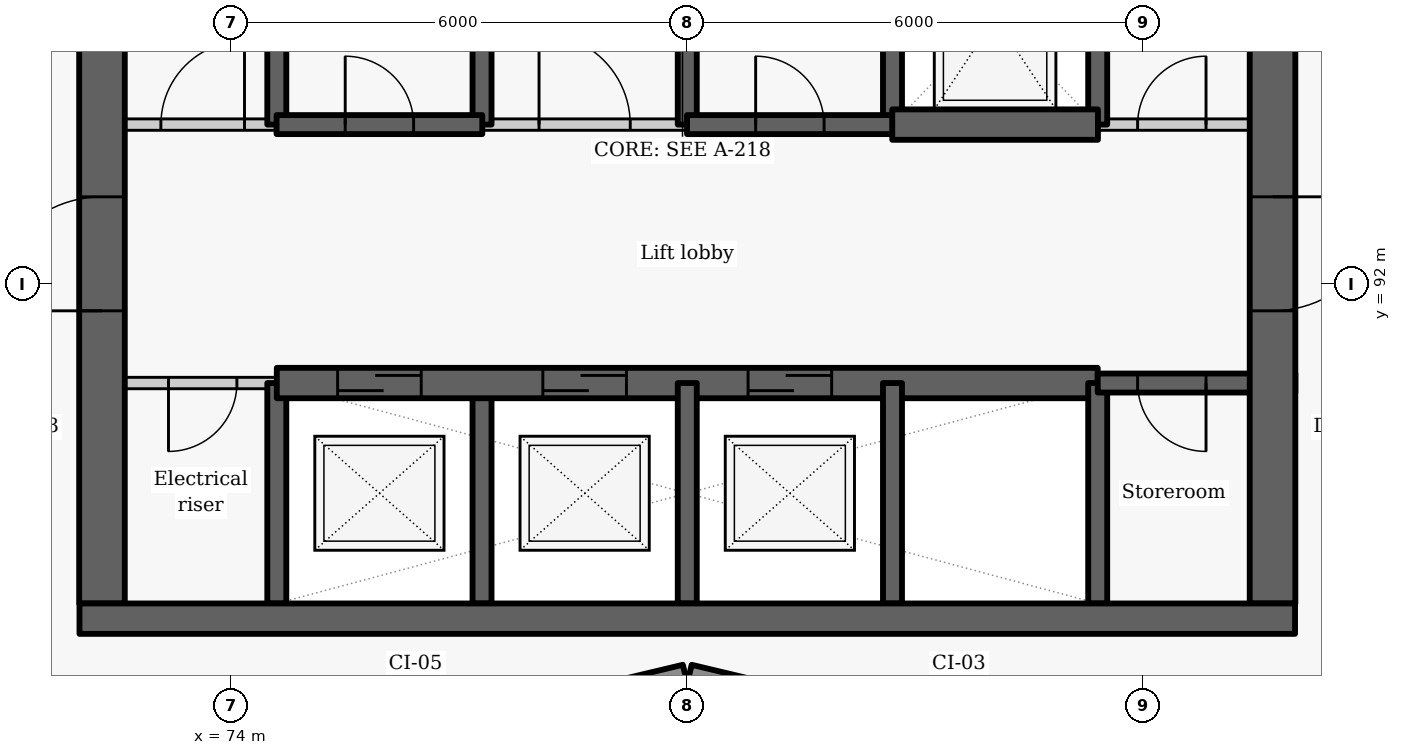
"""IFC4 building model, lengths in metres.
Left out: names, types, materials, properties, quantities, classifications, styles, units other than length and angle.
Written with IfcOpenShell. Run it as: python <this file> out.ifc"""

import sys

from ifc_helpers import new_model, si_unit, direction, frame, frame_2d, origin, place, context, subcontext, project, spatial, rectangle, extrude, element, fill, save


model = new_model("IFC4")
c1 = context("Model", 3, precision=1e-05, world=origin(), true_north=direction((0.0, 1.0)))
c2 = subcontext(c1, "Body", "Model", "MODEL_VIEW")
j1 = project(units=[si_unit("LENGTHUNIT", "METRE"), si_unit("PLANEANGLEUNIT", "RADIAN")], contexts=[c1])
p1 = place(None, origin())
s1 = spatial("IfcSite", under=j1, at=p1, CompositionType="ELEMENT")
p2 = place(p1, origin())
s2 = spatial("IfcBuilding", under=s1, at=p2, CompositionType="ELEMENT")
p3 = place(p2, frame((0.0, 0.0, 87.6)))
s3 = spatial("IfcBuildingStorey", under=s2, at=p3, CompositionType="ELEMENT", Elevation=87.6)
for number, where, z_axis, x_axis in (
    (1, (76.814, 86.119, 0.0), (0.0, 0.0, 1.0), (0.973, 0.232, 0.0)),
    (2, (80.029, 86.872, 0.0), (0.0, 0.0, 1.0), (0.973, -0.232, 0.0)),
):
    element("IfcWall", number, at=place(p3, frame(where, z_axis=z_axis, x_axis=x_axis)), inside=s3, PredefinedType="SOLIDWALL", context=c2, shape_type="SweptSolid", body=[
        extrude(rectangle(XDim=3.246, YDim=0.25, at=frame_2d((1.623, 0.0))), origin(), (0.0, 0.0, 1.0), 2.425),
    ])
p4 = place(p3, frame((74.6, 87.8, -0.275), z_axis=(0.0, 0.0, 1.0), x_axis=(0.0, 1.0, 0.0)))
e3 = element("IfcWall", 3, at=p4, inside=s3, PredefinedType="SHEAR", context=c2, shape_type="SweptSolid", body=[
    extrude(rectangle(XDim=2.9, YDim=0.25, at=frame_2d((1.45, 0.0))), origin(), (0.0, 0.0, 1.0), 3.3),
])
p5 = place(p3, frame((74.6, 94.1, -0.275), z_axis=(0.0, 0.0, 1.0), x_axis=(0.0, 1.0, 0.0)))
e4 = element("IfcWall", 4, at=p5, inside=s3, PredefinedType="SHEAR", context=c2, shape_type="SweptSolid", body=[
    extrude(rectangle(XDim=2.8, YDim=0.25, at=frame_2d((1.4, 0.0))), origin(), (0.0, 0.0, 1.0), 3.3),
])
p6 = place(p3, frame((74.6, 90.7, 0.0), z_axis=(0.0, 0.0, 1.0), x_axis=(-1.0, 0.0, 0.0)))
e5 = element("IfcWall", 5, at=p6, inside=s3, PredefinedType="PARTITIONING", context=c2, shape_type="SweptSolid", body=[
    extrude(rectangle(XDim=2.6, YDim=0.15, at=frame_2d((1.3, 0.0))), origin(), (0.0, 0.0, 1.0), 3.025),
])
p7 = place(p6, frame((0.525, 0.0, 0.0)))
e6 = element("IfcOpeningElement", 6, at=p7, cuts=e5, PredefinedType="OPENING", context=c2, shape_type="SweptSolid", body=[
    extrude(rectangle(XDim=0.9, YDim=2.1, at=frame_2d((0.45, 1.05))), frame((0.0, 0.085, 0.0), z_axis=(0.0, -1.0, 0.0), x_axis=(1.0, 0.0, 0.0)), (0.0, 0.0, 1.0), 0.17),
])
p8 = place(p3, frame((72.3, 87.8, -0.275), z_axis=(0.0, 0.0, 1.0), x_axis=(0.0, 1.0, 0.0)))
e7 = element("IfcWall", 7, at=p8, inside=s3, PredefinedType="SHEAR", context=c2, shape_type="SweptSolid", body=[
    extrude(rectangle(XDim=9.1, YDim=0.6, at=frame_2d((4.55, 0.0))), origin(), (0.0, 0.0, 1.0), 3.3),
])
p9 = place(p8, frame((3.85, 0.0, 0.275)))
e8 = element("IfcOpeningElement", 8, at=p9, cuts=e7, PredefinedType="OPENING", context=c2, shape_type="SweptSolid", body=[
    extrude(rectangle(XDim=1.5, YDim=2.1, at=frame_2d((0.75, 1.05))), frame((0.0, 0.31, 0.0), z_axis=(0.0, -1.0, 0.0), x_axis=(1.0, 0.0, 0.0)), (0.0, 0.0, 1.0), 0.62),
])
p10 = place(p3, frame((77.3, 87.8, -0.275), z_axis=(0.0, 0.0, 1.0), x_axis=(0.0, 1.0, 0.0)))
e9 = element("IfcWall", 9, at=p10, inside=s3, PredefinedType="SHEAR", context=c2, shape_type="SweptSolid", body=[
    extrude(rectangle(XDim=2.9, YDim=0.25, at=frame_2d((1.45, 0.0))), origin(), (0.0, 0.0, 1.0), 3.3),
])
p11 = place(p3, frame((77.3, 94.1, -0.275), z_axis=(0.0, 0.0, 1.0), x_axis=(0.0, 1.0, 0.0)))
e10 = element("IfcWall", 10, at=p11, inside=s3, PredefinedType="SHEAR", context=c2, shape_type="SweptSolid", body=[
    extrude(rectangle(XDim=2.8, YDim=0.25, at=frame_2d((1.4, 0.0))), origin(), (0.0, 0.0, 1.0), 3.3),
])
p12 = place(p3, frame((74.6, 90.7, -0.275), z_axis=(0.0, 0.0, 1.0), x_axis=(1.0, 0.0, 0.0)))
e11 = element("IfcWall", 11, at=p12, inside=s3, PredefinedType="SHEAR", context=c2, shape_type="SweptSolid", body=[
    extrude(rectangle(XDim=10.8, YDim=0.4, at=frame_2d((5.4, 0.0))), origin(), (0.0, 0.0, 1.0), 3.3),
])
p13 = place(p12, frame((0.8, 0.0, 0.275)))
e12 = element("IfcOpeningElement", 12, at=p13, cuts=e11, PredefinedType="OPENING", context=c2, shape_type="SweptSolid", body=[
    extrude(rectangle(XDim=1.1, YDim=2.1, at=frame_2d((0.55, 1.05))), frame((0.0, 0.21, 0.0), z_axis=(0.0, -1.0, 0.0), x_axis=(1.0, 0.0, 0.0)), (0.0, 0.0, 1.0), 0.42),
])
p14 = place(p12, frame((3.5, 0.0, 0.275)))
e13 = element("IfcOpeningElement", 13, at=p14, cuts=e11, PredefinedType="OPENING", context=c2, shape_type="SweptSolid", body=[
    extrude(rectangle(XDim=1.1, YDim=2.1, at=frame_2d((0.55, 1.05))), frame((0.0, 0.21, 0.0), z_axis=(0.0, -1.0, 0.0), x_axis=(1.0, 0.0, 0.0)), (0.0, 0.0, 1.0), 0.42),
])
p15 = place(p12, frame((6.2, 0.0, 0.275)))
e14 = element("IfcOpeningElement", 14, at=p15, cuts=e11, PredefinedType="OPENING", context=c2, shape_type="SweptSolid", body=[
    extrude(rectangle(XDim=1.1, YDim=2.1, at=frame_2d((0.55, 1.05))), frame((0.0, 0.21, 0.0), z_axis=(0.0, -1.0, 0.0), x_axis=(1.0, 0.0, 0.0)), (0.0, 0.0, 1.0), 0.42),
])
p16 = place(p3, frame((80.0, 87.8, -0.275), z_axis=(0.0, 0.0, 1.0), x_axis=(0.0, 1.0, 0.0)))
e15 = element("IfcWall", 15, at=p16, inside=s3, PredefinedType="SHEAR", context=c2, shape_type="SweptSolid", body=[
    extrude(rectangle(XDim=2.9, YDim=0.25, at=frame_2d((1.45, 0.0))), origin(), (0.0, 0.0, 1.0), 3.3),
])
p17 = place(p3, frame((80.0, 94.1, -0.275), z_axis=(0.0, 0.0, 1.0), x_axis=(0.0, 1.0, 0.0)))
e16 = element("IfcWall", 16, at=p17, inside=s3, PredefinedType="SHEAR", context=c2, shape_type="SweptSolid", body=[
    extrude(rectangle(XDim=2.8, YDim=0.25, at=frame_2d((1.4, 0.0))), origin(), (0.0, 0.0, 1.0), 3.3),
])
p18 = place(p3, frame((82.7, 87.8, -0.275), z_axis=(0.0, 0.0, 1.0), x_axis=(0.0, 1.0, 0.0)))
e17 = element("IfcWall", 17, at=p18, inside=s3, PredefinedType="SHEAR", context=c2, shape_type="SweptSolid", body=[
    extrude(rectangle(XDim=2.9, YDim=0.25, at=frame_2d((1.45, 0.0))), origin(), (0.0, 0.0, 1.0), 3.3),
])
p19 = place(p3, frame((82.7, 94.1, -0.275), z_axis=(0.0, 0.0, 1.0), x_axis=(0.0, 1.0, 0.0)))
e18 = element("IfcWall", 18, at=p19, inside=s3, PredefinedType="SHEAR", context=c2, shape_type="SweptSolid", body=[
    extrude(rectangle(XDim=2.8, YDim=0.25, at=frame_2d((1.4, 0.0))), origin(), (0.0, 0.0, 1.0), 3.3),
])
p20 = place(p3, frame((85.4, 87.8, -0.275), z_axis=(0.0, 0.0, 1.0), x_axis=(0.0, 1.0, 0.0)))
e19 = element("IfcWall", 19, at=p20, inside=s3, PredefinedType="SHEAR", context=c2, shape_type="SweptSolid", body=[
    extrude(rectangle(XDim=2.9, YDim=0.25, at=frame_2d((1.45, 0.0))), origin(), (0.0, 0.0, 1.0), 3.3),
])
p21 = place(p3, frame((85.4, 94.1, -0.275), z_axis=(0.0, 0.0, 1.0), x_axis=(0.0, 1.0, 0.0)))
e20 = element("IfcWall", 20, at=p21, inside=s3, PredefinedType="SHEAR", context=c2, shape_type="SweptSolid", body=[
    extrude(rectangle(XDim=2.8, YDim=0.25, at=frame_2d((1.4, 0.0))), origin(), (0.0, 0.0, 1.0), 3.3),
])
p22 = place(p3, frame((88.0, 90.7, -0.275), z_axis=(0.0, 0.0, 1.0), x_axis=(-1.0, 0.0, 0.0)))
e21 = element("IfcWall", 21, at=p22, inside=s3, PredefinedType="SHEAR", context=c2, shape_type="SweptSolid", body=[
    extrude(rectangle(XDim=2.6, YDim=0.25, at=frame_2d((1.3, 0.0))), origin(), (0.0, 0.0, 1.0), 3.3),
])
p23 = place(p22, frame((1.175, 0.0, 0.275)))
e22 = element("IfcOpeningElement", 22, at=p23, cuts=e21, PredefinedType="OPENING", context=c2, shape_type="SweptSolid", body=[
    extrude(rectangle(XDim=0.9, YDim=2.1, at=frame_2d((0.45, 1.05))), frame((0.0, 0.135, 0.0), z_axis=(0.0, -1.0, 0.0), x_axis=(1.0, 0.0, 0.0)), (0.0, 0.0, 1.0), 0.27),
])
p24 = place(p3, frame((87.7, 103.4, -0.275), z_axis=(0.0, 0.0, 1.0), x_axis=(0.0, -1.0, 0.0)))
e23 = element("IfcWall", 23, at=p24, inside=s3, PredefinedType="SHEAR", context=c2, shape_type="SweptSolid", body=[
    extrude(rectangle(XDim=15.6, YDim=0.6, at=frame_2d((7.8, 0.0))), origin(), (0.0, 0.0, 1.0), 3.3),
])
p25 = place(p24, frame((10.25, 0.0, 0.275)))
e24 = element("IfcOpeningElement", 24, at=p25, cuts=e23, PredefinedType="OPENING", context=c2, shape_type="SweptSolid", body=[
    extrude(rectangle(XDim=1.5, YDim=2.1, at=frame_2d((0.75, 1.05))), frame((0.0, 0.31, 0.0), z_axis=(0.0, -1.0, 0.0), x_axis=(1.0, 0.0, 0.0)), (0.0, 0.0, 1.0), 0.62),
])
p26 = place(p24, frame((2.7, 0.0, 0.275)))
e25 = element("IfcOpeningElement", 25, at=p26, cuts=e23, PredefinedType="OPENING", context=c2, shape_type="SweptSolid", body=[
    extrude(rectangle(XDim=1.1, YDim=2.1, at=frame_2d((0.55, 1.05))), frame((0.0, 0.31, 0.0), z_axis=(0.0, -1.0, 0.0), x_axis=(1.0, 0.0, 0.0)), (0.0, 0.0, 1.0), 0.62),
])
p27 = place(p3, frame((72.0, 94.1, 0.0), z_axis=(0.0, 0.0, 1.0), x_axis=(1.0, 0.0, 0.0)))
e26 = element("IfcWall", 26, at=p27, inside=s3, PredefinedType="PARTITIONING", context=c2, shape_type="SweptSolid", body=[
    extrude(rectangle(XDim=2.603, YDim=0.15, at=frame_2d((1.302, 0.0))), origin(), (0.0, 0.0, 1.0), 3.025),
])
p28 = place(p27, frame((1.075, 0.0, 0.0)))
e27 = element("IfcOpeningElement", 27, at=p28, cuts=e26, PredefinedType="OPENING", context=c2, shape_type="SweptSolid", body=[
    extrude(rectangle(XDim=1.1, YDim=2.1, at=frame_2d((0.55, 1.05))), frame((0.0, 0.085, 0.0), z_axis=(0.0, -1.0, 0.0), x_axis=(1.0, 0.0, 0.0)), (0.0, 0.0, 1.0), 0.17),
])
p29 = place(p3, frame((77.297, 94.1, 0.0), z_axis=(0.0, 0.0, 1.0), x_axis=(1.0, 0.0, 0.0)))
e28 = element("IfcWall", 28, at=p29, inside=s3, PredefinedType="PARTITIONING", context=c2, shape_type="SweptSolid", body=[
    extrude(rectangle(XDim=2.706, YDim=0.15, at=frame_2d((1.353, 0.0))), origin(), (0.0, 0.0, 1.0), 3.025),
])
p30 = place(p29, frame((0.753, 0.0, 0.0)))
e29 = element("IfcOpeningElement", 29, at=p30, cuts=e28, PredefinedType="OPENING", context=c2, shape_type="SweptSolid", body=[
    extrude(rectangle(XDim=1.2, YDim=2.1, at=frame_2d((0.6, 1.05))), frame((0.0, 0.085, 0.0), z_axis=(0.0, -1.0, 0.0), x_axis=(1.0, 0.0, 0.0)), (0.0, 0.0, 1.0), 0.17),
])
p31 = place(p3, frame((85.397, 94.1, 0.0), z_axis=(0.0, 0.0, 1.0), x_axis=(1.0, 0.0, 0.0)))
e30 = element("IfcWall", 30, at=p31, inside=s3, PredefinedType="PARTITIONING", context=c2, shape_type="SweptSolid", body=[
    extrude(rectangle(XDim=2.603, YDim=0.15, at=frame_2d((1.302, 0.0))), origin(), (0.0, 0.0, 1.0), 3.025),
])
p32 = place(p31, frame((0.528, 0.0, 0.0)))
e31 = element("IfcOpeningElement", 31, at=p32, cuts=e30, PredefinedType="OPENING", context=c2, shape_type="SweptSolid", body=[
    extrude(rectangle(XDim=0.9, YDim=2.1, at=frame_2d((0.45, 1.05))), frame((0.0, 0.085, 0.0), z_axis=(0.0, -1.0, 0.0), x_axis=(1.0, 0.0, 0.0)), (0.0, 0.0, 1.0), 0.17),
])
p33 = place(p3, frame((74.597, 94.1, -0.275), z_axis=(0.0, 0.0, 1.0), x_axis=(1.0, 0.0, 0.0)))
e32 = element("IfcWall", 32, at=p33, inside=s3, PredefinedType="SHEAR", context=c2, shape_type="SweptSolid", body=[
    extrude(rectangle(XDim=2.706, YDim=0.25, at=frame_2d((1.353, 0.0))), origin(), (0.0, 0.0, 1.0), 3.3),
])
p34 = place(p33, frame((0.903, 0.0, 0.275)))
e33 = element("IfcOpeningElement", 33, at=p34, cuts=e32, PredefinedType="OPENING", context=c2, shape_type="SweptSolid", body=[
    extrude(rectangle(XDim=0.9, YDim=2.1, at=frame_2d((0.45, 1.05))), frame((0.0, 0.135, 0.0), z_axis=(0.0, -1.0, 0.0), x_axis=(1.0, 0.0, 0.0)), (0.0, 0.0, 1.0), 0.27),
])
p35 = place(p3, frame((79.997, 94.1, -0.275), z_axis=(0.0, 0.0, 1.0), x_axis=(1.0, 0.0, 0.0)))
e34 = element("IfcWall", 34, at=p35, inside=s3, PredefinedType="SHEAR", context=c2, shape_type="SweptSolid", body=[
    extrude(rectangle(XDim=2.706, YDim=0.25, at=frame_2d((1.353, 0.0))), origin(), (0.0, 0.0, 1.0), 3.3),
])
p36 = place(p35, frame((0.903, 0.0, 0.275)))
e35 = element("IfcOpeningElement", 35, at=p36, cuts=e34, PredefinedType="OPENING", context=c2, shape_type="SweptSolid", body=[
    extrude(rectangle(XDim=0.9, YDim=2.1, at=frame_2d((0.45, 1.05))), frame((0.0, 0.135, 0.0), z_axis=(0.0, -1.0, 0.0), x_axis=(1.0, 0.0, 0.0)), (0.0, 0.0, 1.0), 0.27),
])
p37 = place(p3, frame((82.697, 94.1, -0.275), z_axis=(0.0, 0.0, 1.0), x_axis=(1.0, 0.0, 0.0)))
e36 = element("IfcWall", 36, at=p37, inside=s3, PredefinedType="SHEAR", context=c2, shape_type="SweptSolid", body=[
    extrude(rectangle(XDim=2.706, YDim=0.4, at=frame_2d((1.353, 0.0))), origin(), (0.0, 0.0, 1.0), 3.3),
])
p38 = place(p3, frame((72.004, 87.6, -0.275), z_axis=(0.0, 0.0, 1.0), x_axis=(1.0, 0.0, 0.0)))
e37 = element("IfcWall", 37, at=p38, inside=s3, PredefinedType="SHEAR", context=c2, shape_type="SweptSolid", body=[
    extrude(rectangle(XDim=15.992, YDim=0.4, at=frame_2d((7.996, 0.0))), origin(), (0.0, 0.0, 1.0), 3.3),
])
p39 = place(p7, origin())
e38 = element("IfcDoor", 38, at=p39, inside=s3, OperationType="SINGLE_SWING_RIGHT", PredefinedType="DOOR", context=c2, shape_type="SweptSolid", body=[
    extrude(rectangle(XDim=0.9, YDim=2.1, at=frame_2d((0.45, 1.05))), frame((0.0, 0.025, 0.0), z_axis=(0.0, -1.0, 0.0), x_axis=(1.0, 0.0, 0.0)), (0.0, 0.0, 1.0), 0.05),
])
fill(e6, e38)
p40 = place(p13, origin())
e39 = element("IfcDoor", 39, at=p40, inside=s3, OperationType="SLIDING_TO_LEFT", PredefinedType="DOOR", context=c2, shape_type="SweptSolid", body=[
    extrude(rectangle(XDim=1.1, YDim=2.1, at=frame_2d((0.55, 1.05))), frame((0.0, 0.025, 0.0), z_axis=(0.0, -1.0, 0.0), x_axis=(1.0, 0.0, 0.0)), (0.0, 0.0, 1.0), 0.05),
])
fill(e12, e39)
p41 = place(p14, origin())
e40 = element("IfcDoor", 40, at=p41, inside=s3, OperationType="SLIDING_TO_LEFT", PredefinedType="DOOR", context=c2, shape_type="SweptSolid", body=[
    extrude(rectangle(XDim=1.1, YDim=2.1, at=frame_2d((0.55, 1.05))), frame((0.0, 0.025, 0.0), z_axis=(0.0, -1.0, 0.0), x_axis=(1.0, 0.0, 0.0)), (0.0, 0.0, 1.0), 0.05),
])
fill(e13, e40)
p42 = place(p15, origin())
e41 = element("IfcDoor", 41, at=p42, inside=s3, OperationType="SLIDING_TO_LEFT", PredefinedType="DOOR", context=c2, shape_type="SweptSolid", body=[
    extrude(rectangle(XDim=1.1, YDim=2.1, at=frame_2d((0.55, 1.05))), frame((0.0, 0.025, 0.0), z_axis=(0.0, -1.0, 0.0), x_axis=(1.0, 0.0, 0.0)), (0.0, 0.0, 1.0), 0.05),
])
fill(e14, e41)
p43 = place(p23, origin())
e42 = element("IfcDoor", 42, at=p43, inside=s3, OperationType="SINGLE_SWING_LEFT", PredefinedType="DOOR", context=c2, shape_type="SweptSolid", body=[
    extrude(rectangle(XDim=0.9, YDim=2.1, at=frame_2d((0.45, 1.05))), frame((0.0, 0.025, 0.0), z_axis=(0.0, -1.0, 0.0), x_axis=(1.0, 0.0, 0.0)), (0.0, 0.0, 1.0), 0.05),
])
fill(e22, e42)
p44 = place(p28, origin())
e43 = element("IfcDoor", 43, at=p44, inside=s3, OperationType="SINGLE_SWING_RIGHT", PredefinedType="DOOR", context=c2, shape_type="SweptSolid", body=[
    extrude(rectangle(XDim=1.1, YDim=2.1, at=frame_2d((0.55, 1.05))), frame((0.0, 0.025, 0.0), z_axis=(0.0, -1.0, 0.0), x_axis=(1.0, 0.0, 0.0)), (0.0, 0.0, 1.0), 0.05),
])
fill(e27, e43)
p45 = place(p34, origin())
e44 = element("IfcDoor", 44, at=p45, inside=s3, OperationType="SINGLE_SWING_LEFT", PredefinedType="DOOR", context=c2, shape_type="SweptSolid", body=[
    extrude(rectangle(XDim=0.9, YDim=2.1, at=frame_2d((0.45, 1.05))), frame((0.0, 0.025, 0.0), z_axis=(0.0, -1.0, 0.0), x_axis=(1.0, 0.0, 0.0)), (0.0, 0.0, 1.0), 0.05),
])
fill(e33, e44)
p46 = place(p30, origin())
e45 = element("IfcDoor", 45, at=p46, inside=s3, OperationType="DOUBLE_DOOR_SINGLE_SWING", PredefinedType="DOOR", context=c2, shape_type="SweptSolid", body=[
    extrude(rectangle(XDim=1.2, YDim=2.1, at=frame_2d((0.6, 1.05))), frame((0.0, 0.025, 0.0), z_axis=(0.0, -1.0, 0.0), x_axis=(1.0, 0.0, 0.0)), (0.0, 0.0, 1.0), 0.05),
])
fill(e29, e45)
p47 = place(p36, origin())
e46 = element("IfcDoor", 46, at=p47, inside=s3, OperationType="SINGLE_SWING_LEFT", PredefinedType="DOOR", context=c2, shape_type="SweptSolid", body=[
    extrude(rectangle(XDim=0.9, YDim=2.1, at=frame_2d((0.45, 1.05))), frame((0.0, 0.025, 0.0), z_axis=(0.0, -1.0, 0.0), x_axis=(1.0, 0.0, 0.0)), (0.0, 0.0, 1.0), 0.05),
])
fill(e35, e46)
p48 = place(p32, origin())
e47 = element("IfcDoor", 47, at=p48, inside=s3, OperationType="SINGLE_SWING_RIGHT", PredefinedType="DOOR", context=c2, shape_type="SweptSolid", body=[
    extrude(rectangle(XDim=0.9, YDim=2.1, at=frame_2d((0.45, 1.05))), frame((0.0, 0.025, 0.0), z_axis=(0.0, -1.0, 0.0), x_axis=(1.0, 0.0, 0.0)), (0.0, 0.0, 1.0), 0.05),
])
fill(e31, e47)
p49 = place(p25, origin())
e48 = element("IfcDoor", 48, at=p49, inside=s3, OperationType="DOUBLE_DOOR_SINGLE_SWING", PredefinedType="DOOR", context=c2, shape_type="SweptSolid", body=[
    extrude(rectangle(XDim=1.5, YDim=2.1, at=frame_2d((0.75, 1.05))), frame((0.0, 0.025, 0.0), z_axis=(0.0, -1.0, 0.0), x_axis=(1.0, 0.0, 0.0)), (0.0, 0.0, 1.0), 0.05),
])
fill(e24, e48)
p50 = place(p9, origin())
e49 = element("IfcDoor", 49, at=p50, inside=s3, OperationType="DOUBLE_DOOR_SINGLE_SWING", PredefinedType="DOOR", context=c2, shape_type="SweptSolid", body=[
    extrude(rectangle(XDim=1.5, YDim=2.1, at=frame_2d((0.75, 1.05))), frame((0.0, 0.025, 0.0), z_axis=(0.0, -1.0, 0.0), x_axis=(1.0, 0.0, 0.0)), (0.0, 0.0, 1.0), 0.05),
])
fill(e8, e49)
save(model, sys.argv[1])
